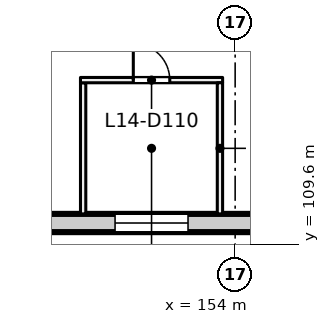
"""IFC4 building model, lengths in metres.
Left out: names, types, materials, properties, quantities, classifications, styles, units other than length and angle.
Written with IfcOpenShell. Run it as: python <this file> out.ifc"""

import sys

from ifc_helpers import new_model, si_unit, direction, frame, frame_2d, origin, place, context, subcontext, project, spatial, rectangle, extrude, element, fill, save


model = new_model("IFC4")
c1 = context("Model", 3, precision=1e-05, world=origin(), true_north=direction((0.0, 1.0)))
c2 = subcontext(c1, "Body", "Model", "MODEL_VIEW")
j1 = project(units=[si_unit("LENGTHUNIT", "METRE"), si_unit("PLANEANGLEUNIT", "RADIAN")], contexts=[c1])
p1 = place(None, origin())
s1 = spatial("IfcSite", under=j1, at=p1, CompositionType="ELEMENT")
p2 = place(p1, origin())
s2 = spatial("IfcBuilding", under=s1, at=p2, CompositionType="ELEMENT")
p3 = place(p2, frame((0.0, 0.0, 63.5)))
s3 = spatial("IfcBuildingStorey", under=s2, at=p3, CompositionType="ELEMENT", Elevation=63.5)
p4 = place(p3, frame((162.93, 110.3, 0.0), z_axis=(0.0, 0.0, 1.0), x_axis=(-1.0, 0.0, 0.0)))
e1 = element("IfcWall", 1, at=p4, inside=s3, PredefinedType="SOLIDWALL", context=c2, shape_type="SweptSolid", body=[
    extrude(rectangle(XDim=31.93, YDim=0.6, at=frame_2d((15.965, 0.0))), origin(), (0.0, 0.0, 1.0), 3.625),
])
p5 = place(p4, frame((1.48, 0.0, 0.9)))
e2 = element("IfcOpeningElement", 2, at=p5, cuts=e1, PredefinedType="OPENING", context=c2, shape_type="SweptSolid", body=[
    extrude(rectangle(XDim=2.4, YDim=2.4, at=frame_2d((1.2, 1.2))), frame((0.0, 0.31, 0.0), z_axis=(0.0, -1.0, 0.0), x_axis=(1.0, 0.0, 0.0)), (0.0, 0.0, 1.0), 0.62),
])
p6 = place(p4, frame((5.98, 0.0, 0.9)))
e3 = element("IfcOpeningElement", 3, at=p6, cuts=e1, PredefinedType="OPENING", context=c2, shape_type="SweptSolid", body=[
    extrude(rectangle(XDim=2.4, YDim=2.4, at=frame_2d((1.2, 1.2))), frame((0.0, 0.31, 0.0), z_axis=(0.0, -1.0, 0.0), x_axis=(1.0, 0.0, 0.0)), (0.0, 0.0, 1.0), 0.62),
])
p7 = place(p4, frame((10.48, 0.0, 0.9)))
e4 = element("IfcOpeningElement", 4, at=p7, cuts=e1, PredefinedType="OPENING", context=c2, shape_type="SweptSolid", body=[
    extrude(rectangle(XDim=2.4, YDim=2.4, at=frame_2d((1.2, 1.2))), frame((0.0, 0.31, 0.0), z_axis=(0.0, -1.0, 0.0), x_axis=(1.0, 0.0, 0.0)), (0.0, 0.0, 1.0), 0.62),
])
p8 = place(p4, frame((14.98, 0.0, 0.9)))
e5 = element("IfcOpeningElement", 5, at=p8, cuts=e1, PredefinedType="OPENING", context=c2, shape_type="SweptSolid", body=[
    extrude(rectangle(XDim=2.4, YDim=2.4, at=frame_2d((1.2, 1.2))), frame((0.0, 0.31, 0.0), z_axis=(0.0, -1.0, 0.0), x_axis=(1.0, 0.0, 0.0)), (0.0, 0.0, 1.0), 0.62),
])
p9 = place(p4, frame((19.48, 0.0, 0.9)))
e6 = element("IfcOpeningElement", 6, at=p9, cuts=e1, PredefinedType="OPENING", context=c2, shape_type="SweptSolid", body=[
    extrude(rectangle(XDim=2.4, YDim=2.4, at=frame_2d((1.2, 1.2))), frame((0.0, 0.31, 0.0), z_axis=(0.0, -1.0, 0.0), x_axis=(1.0, 0.0, 0.0)), (0.0, 0.0, 1.0), 0.62),
])
p10 = place(p4, frame((23.98, 0.0, 0.9)))
e7 = element("IfcOpeningElement", 7, at=p10, cuts=e1, PredefinedType="OPENING", context=c2, shape_type="SweptSolid", body=[
    extrude(rectangle(XDim=2.4, YDim=2.4, at=frame_2d((1.2, 1.2))), frame((0.0, 0.31, 0.0), z_axis=(0.0, -1.0, 0.0), x_axis=(1.0, 0.0, 0.0)), (0.0, 0.0, 1.0), 0.62),
])
p11 = place(p4, frame((28.48, 0.0, 0.9)))
e8 = element("IfcOpeningElement", 8, at=p11, cuts=e1, PredefinedType="OPENING", context=c2, shape_type="SweptSolid", body=[
    extrude(rectangle(XDim=2.4, YDim=2.4, at=frame_2d((1.2, 1.2))), frame((0.0, 0.31, 0.0), z_axis=(0.0, -1.0, 0.0), x_axis=(1.0, 0.0, 0.0)), (0.0, 0.0, 1.0), 0.62),
])
p12 = place(p3, frame((149.0, 110.6, 0.0), z_axis=(0.0, 0.0, 1.0), x_axis=(0.0, 1.0, 0.0)))
e9 = element("IfcWall", 9, at=p12, inside=s3, PredefinedType="PARTITIONING", context=c2, shape_type="SweptSolid", body=[
    extrude(rectangle(XDim=4.312, YDim=0.175, at=frame_2d((2.156, 0.0))), origin(), (0.0, 0.0, 1.0), 3.625),
])
p13 = place(p3, frame((148.912, 115.0, 0.0), z_axis=(0.0, 0.0, 1.0), x_axis=(1.0, 0.0, 0.0)))
e10 = element("IfcWall", 10, at=p13, inside=s3, PredefinedType="PARTITIONING", context=c2, shape_type="SweptSolid", body=[
    extrude(rectangle(XDim=4.676, YDim=0.175, at=frame_2d((2.338, 0.0))), origin(), (0.0, 0.0, 1.0), 3.625),
])
p14 = place(p13, frame((1.738, 0.0, 0.0)))
e11 = element("IfcOpeningElement", 11, at=p14, cuts=e10, PredefinedType="OPENING", context=c2, shape_type="SweptSolid", body=[
    extrude(rectangle(XDim=1.2, YDim=2.1, at=frame_2d((0.6, 1.05))), frame((0.0, 0.097, 0.0), z_axis=(0.0, -1.0, 0.0), x_axis=(1.0, 0.0, 0.0)), (0.0, 0.0, 1.0), 0.195),
])
p15 = place(p3, frame((153.5, 114.912, 0.0), z_axis=(0.0, 0.0, 1.0), x_axis=(0.0, -1.0, 0.0)))
e12 = element("IfcWall", 12, at=p15, inside=s3, PredefinedType="PARTITIONING", context=c2, shape_type="SweptSolid", body=[
    extrude(rectangle(XDim=4.312, YDim=0.175, at=frame_2d((2.156, 0.0))), origin(), (0.0, 0.0, 1.0), 3.625),
])
p16 = place(p7, origin())
e13 = element("IfcWindow", 13, at=p16, inside=s3, PartitioningType="SINGLE_PANEL", PredefinedType="WINDOW", context=c2, shape_type="SweptSolid", body=[
    extrude(rectangle(XDim=2.4, YDim=2.4, at=frame_2d((1.2, 1.2))), frame((0.0, 0.03, 0.0), z_axis=(0.0, -1.0, 0.0), x_axis=(1.0, 0.0, 0.0)), (0.0, 0.0, 1.0), 0.06),
])
fill(e4, e13)
p17 = place(p14, origin())
e14 = element("IfcDoor", 14, at=p17, inside=s3, OperationType="DOUBLE_DOOR_SINGLE_SWING", PredefinedType="DOOR", context=c2, shape_type="SweptSolid", body=[
    extrude(rectangle(XDim=1.2, YDim=2.1, at=frame_2d((0.6, 1.05))), frame((0.0, 0.025, 0.0), z_axis=(0.0, -1.0, 0.0), x_axis=(1.0, 0.0, 0.0)), (0.0, 0.0, 1.0), 0.05),
])
fill(e11, e14)
save(model, sys.argv[1])
